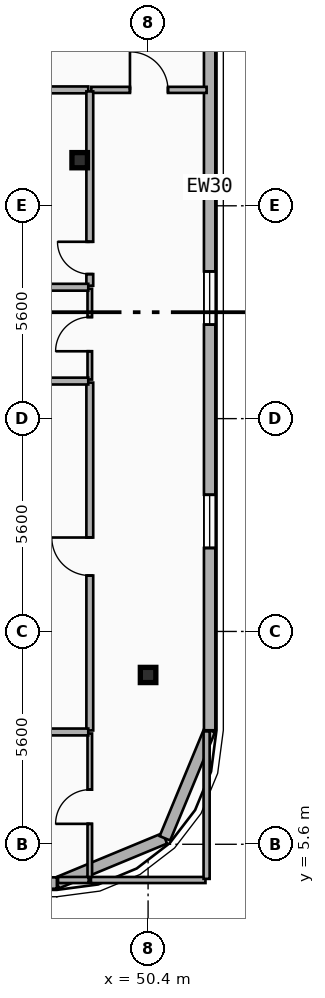
"""IFC4 building model, lengths in metres.
Left out: names, types, materials, properties, quantities, classifications, styles, units other than length and angle.
Written with IfcOpenShell. Run it as: python <this file> out.ifc"""

import sys

from ifc_helpers import new_model, si_unit, direction, frame, frame_2d, origin, origin_2d, place, context, subcontext, project, spatial, rectangle, i_section, extrude, element, fill, save


model = new_model("IFC4")
c1 = context("Model", 3, precision=1e-05, world=origin(), true_north=direction((0.0, 1.0)))
c2 = subcontext(c1, "Body", "Model", "MODEL_VIEW")
j1 = project(units=[si_unit("LENGTHUNIT", "METRE"), si_unit("PLANEANGLEUNIT", "RADIAN")], contexts=[c1])
p1 = place(None, origin())
s1 = spatial("IfcSite", under=j1, at=p1, CompositionType="ELEMENT")
p2 = place(p1, origin())
s2 = spatial("IfcBuilding", under=s1, at=p2, CompositionType="ELEMENT")
p3 = place(p2, frame((0.0, 0.0, 196.8)))
s3 = spatial("IfcBuildingStorey", under=s2, at=p3, CompositionType="ELEMENT", Elevation=196.8)
p4 = place(p3, frame((48.6, 23.6, 0.0), z_axis=(0.0, 0.0, 1.0), x_axis=(1.0, 0.0, 0.0)))
e1 = element("IfcColumn", 1, at=p4, inside=s3, PredefinedType="COLUMN", context=c2, shape_type="SweptSolid", body=[
    extrude(i_section(OverallWidth=0.408, OverallDepth=0.4, WebThickness=0.025, FlangeThickness=0.039, FilletRadius=0.015, at=origin_2d()), origin(), (0.0, 0.0, 1.0), 3.6),
])
p5 = place(p3, frame((50.4, 10.151, 0.0), z_axis=(0.0, -0.079906436036, 0.996802368316), x_axis=(1.0, 0.0, 0.0)))
e2 = element("IfcColumn", 2, at=p5, inside=s3, PredefinedType="COLUMN", context=c2, shape_type="SweptSolid", body=[
    extrude(i_section(OverallWidth=0.408, OverallDepth=0.4, WebThickness=0.025, FlangeThickness=0.039, FilletRadius=0.015, at=origin_2d()), origin(), (0.0, 0.0, 1.0), 3.611),
])
p6 = place(p3, frame((50.843, 5.757, 0.0), z_axis=(0.0, 0.0, 1.0), x_axis=(-0.92389884758, -0.382636798336, 0.0)))
e3 = element("IfcWall", 3, at=p6, inside=s3, PredefinedType="SOLIDWALL", context=c2, shape_type="SweptSolid", body=[
    extrude(rectangle(XDim=3.077, YDim=0.3, at=frame_2d((1.538, 0.0))), origin(), (0.0, 0.0, 1.0), 3.34),
])
p7 = place(p3, frame((52.02, 8.6, 0.0), z_axis=(0.0, 0.0, 1.0), x_axis=(-0.382676475685, -0.923882414032, 0.0)))
e4 = element("IfcWall", 4, at=p7, inside=s3, PredefinedType="SOLIDWALL", context=c2, shape_type="SweptSolid", body=[
    extrude(rectangle(XDim=3.077, YDim=0.3, at=frame_2d((1.539, 0.0))), origin(), (0.0, 0.0, 1.0), 3.34),
])
p8 = place(p3, frame((52.02, 37.2, 0.0), z_axis=(0.0, 0.0, 1.0), x_axis=(0.0, -1.0, 0.0)))
e5 = element("IfcWall", 5, at=p8, inside=s3, PredefinedType="SOLIDWALL", context=c2, shape_type="SweptSolid", body=[
    extrude(rectangle(XDim=28.6, YDim=0.3, at=frame_2d((14.3, 0.0))), origin(), (0.0, 0.0, 1.0), 3.34),
])
p9 = place(p8, frame((2.38, 0.0, 0.34)))
e6 = element("IfcOpeningElement", 6, at=p9, cuts=e5, PredefinedType="OPENING", context=c2, shape_type="SweptSolid", body=[
    extrude(rectangle(XDim=1.4, YDim=2.1, at=frame_2d((0.7, 1.05))), frame((0.0, 0.16, 0.0), z_axis=(0.0, -1.0, 0.0), x_axis=(1.0, 0.0, 0.0)), (0.0, 0.0, 1.0), 0.32),
])
p10 = place(p8, frame((5.84, 0.0, 0.34)))
e7 = element("IfcOpeningElement", 7, at=p10, cuts=e5, PredefinedType="OPENING", context=c2, shape_type="SweptSolid", body=[
    extrude(rectangle(XDim=1.4, YDim=2.1, at=frame_2d((0.7, 1.05))), frame((0.0, 0.16, 0.0), z_axis=(0.0, -1.0, 0.0), x_axis=(1.0, 0.0, 0.0)), (0.0, 0.0, 1.0), 0.32),
])
p11 = place(p8, frame((16.527, 0.0, 0.34)))
e8 = element("IfcOpeningElement", 8, at=p11, cuts=e5, PredefinedType="OPENING", context=c2, shape_type="SweptSolid", body=[
    extrude(rectangle(XDim=1.4, YDim=2.1, at=frame_2d((0.7, 1.05))), frame((0.0, 0.16, 0.0), z_axis=(0.0, -1.0, 0.0), x_axis=(1.0, 0.0, 0.0)), (0.0, 0.0, 1.0), 0.32),
])
p12 = place(p8, frame((22.403, 0.0, 0.34)))
e9 = element("IfcOpeningElement", 9, at=p12, cuts=e5, PredefinedType="OPENING", context=c2, shape_type="SweptSolid", body=[
    extrude(rectangle(XDim=1.4, YDim=2.1, at=frame_2d((0.7, 1.05))), frame((0.0, 0.16, 0.0), z_axis=(0.0, -1.0, 0.0), x_axis=(1.0, 0.0, 0.0)), (0.0, 0.0, 1.0), 0.32),
])
p13 = place(p3, frame((48.0, 4.58, 0.0), z_axis=(0.0, 0.0, 1.0), x_axis=(-1.0, 0.0, 0.0)))
e10 = element("IfcWall", 10, at=p13, inside=s3, PredefinedType="SOLIDWALL", context=c2, shape_type="SweptSolid", body=[
    extrude(rectangle(XDim=38.4, YDim=0.3, at=frame_2d((19.2, 0.0))), origin(), (0.0, 0.0, 1.0), 3.34),
])
p14 = place(p13, frame((36.19, 0.0, 0.8)))
e11 = element("IfcOpeningElement", 11, at=p14, cuts=e10, PredefinedType="OPENING", context=c2, shape_type="SweptSolid", body=[
    extrude(rectangle(XDim=1.8, YDim=1.8, at=frame_2d((0.9, 0.9))), frame((0.0, 0.16, 0.0), z_axis=(0.0, -1.0, 0.0), x_axis=(1.0, 0.0, 0.0)), (0.0, 0.0, 1.0), 0.32),
])
p15 = place(p13, frame((29.712, 0.0, 0.7)))
e12 = element("IfcOpeningElement", 12, at=p15, cuts=e10, PredefinedType="OPENING", context=c2, shape_type="SweptSolid", body=[
    extrude(rectangle(XDim=2.0, YDim=2.2, at=frame_2d((1.0, 1.1))), frame((0.0, 0.16, 0.0), z_axis=(0.0, -1.0, 0.0), x_axis=(1.0, 0.0, 0.0)), (0.0, 0.0, 1.0), 0.32),
])
p16 = place(p13, frame((33.038, 0.0, 0.7)))
e13 = element("IfcOpeningElement", 13, at=p16, cuts=e10, PredefinedType="OPENING", context=c2, shape_type="SweptSolid", body=[
    extrude(rectangle(XDim=2.0, YDim=2.2, at=frame_2d((1.0, 1.1))), frame((0.0, 0.16, 0.0), z_axis=(0.0, -1.0, 0.0), x_axis=(1.0, 0.0, 0.0)), (0.0, 0.0, 1.0), 0.32),
])
p17 = place(p13, frame((20.0, 0.0, 0.7)))
e14 = element("IfcOpeningElement", 14, at=p17, cuts=e10, PredefinedType="OPENING", context=c2, shape_type="SweptSolid", body=[
    extrude(rectangle(XDim=2.0, YDim=2.2, at=frame_2d((1.0, 1.1))), frame((0.0, 0.16, 0.0), z_axis=(0.0, -1.0, 0.0), x_axis=(1.0, 0.0, 0.0)), (0.0, 0.0, 1.0), 0.32),
])
p18 = place(p13, frame((25.2, 0.0, 0.7)))
e15 = element("IfcOpeningElement", 15, at=p18, cuts=e10, PredefinedType="OPENING", context=c2, shape_type="SweptSolid", body=[
    extrude(rectangle(XDim=2.0, YDim=2.2, at=frame_2d((1.0, 1.1))), frame((0.0, 0.16, 0.0), z_axis=(0.0, -1.0, 0.0), x_axis=(1.0, 0.0, 0.0)), (0.0, 0.0, 1.0), 0.32),
])
p19 = place(p13, frame((13.4, 0.0, 0.7)))
e16 = element("IfcOpeningElement", 16, at=p19, cuts=e10, PredefinedType="OPENING", context=c2, shape_type="SweptSolid", body=[
    extrude(rectangle(XDim=2.0, YDim=2.2, at=frame_2d((1.0, 1.1))), frame((0.0, 0.16, 0.0), z_axis=(0.0, -1.0, 0.0), x_axis=(1.0, 0.0, 0.0)), (0.0, 0.0, 1.0), 0.32),
])
p20 = place(p13, frame((6.993, 0.0, 0.7)))
e17 = element("IfcOpeningElement", 17, at=p20, cuts=e10, PredefinedType="OPENING", context=c2, shape_type="SweptSolid", body=[
    extrude(rectangle(XDim=2.0, YDim=2.2, at=frame_2d((1.0, 1.1))), frame((0.0, 0.16, 0.0), z_axis=(0.0, -1.0, 0.0), x_axis=(1.0, 0.0, 0.0)), (0.0, 0.0, 1.0), 0.32),
])
p21 = place(p13, frame((3.469, 0.0, 0.7)))
e18 = element("IfcOpeningElement", 18, at=p21, cuts=e10, PredefinedType="OPENING", context=c2, shape_type="SweptSolid", body=[
    extrude(rectangle(XDim=2.0, YDim=2.2, at=frame_2d((1.0, 1.1))), frame((0.0, 0.16, 0.0), z_axis=(0.0, -1.0, 0.0), x_axis=(1.0, 0.0, 0.0)), (0.0, 0.0, 1.0), 0.32),
])
p22 = place(p13, frame((0.41, 0.0, 0.8)))
e19 = element("IfcOpeningElement", 19, at=p22, cuts=e10, PredefinedType="OPENING", context=c2, shape_type="SweptSolid", body=[
    extrude(rectangle(XDim=1.8, YDim=1.8, at=frame_2d((0.9, 0.9))), frame((0.0, 0.16, 0.0), z_axis=(0.0, -1.0, 0.0), x_axis=(1.0, 0.0, 0.0)), (0.0, 0.0, 1.0), 0.32),
])
p23 = place(p3, frame((48.906, 25.45, 0.0), z_axis=(0.0, 0.0, 1.0), x_axis=(1.0, 0.0, 0.0)))
e20 = element("IfcWall", 20, at=p23, inside=s3, PredefinedType="PARTITIONING", context=c2, shape_type="SweptSolid", body=[
    extrude(rectangle(XDim=3.034, YDim=0.16, at=frame_2d((1.517, 0.0))), origin(), (0.0, 0.0, 1.0), 2.67),
])
p24 = place(p23, frame((1.017, 0.0, 0.0)))
e21 = element("IfcOpeningElement", 21, at=p24, cuts=e20, PredefinedType="OPENING", context=c2, shape_type="SweptSolid", body=[
    extrude(rectangle(XDim=1.0, YDim=2.15, at=frame_2d((0.5, 1.075))), frame((0.0, 0.09, 0.0), z_axis=(0.0, -1.0, 0.0), x_axis=(1.0, 0.0, 0.0)), (0.0, 0.0, 1.0), 0.18),
])
p25 = place(p3, frame((45.44, 25.45, 0.0), z_axis=(0.0, 0.0, 1.0), x_axis=(1.0, 0.0, 0.0)))
e22 = element("IfcWall", 22, at=p25, inside=s3, PredefinedType="PLUMBINGWALL", context=c2, shape_type="SweptSolid", body=[
    extrude(rectangle(XDim=3.386, YDim=0.18, at=frame_2d((1.693, 0.0))), origin(), (0.0, 0.0, 1.0), 2.42),
])
p26 = place(p3, frame((48.866, 4.66, 0.0), z_axis=(0.0, 0.0, 1.0), x_axis=(0.0, 1.0, 0.0)))
e23 = element("IfcWall", 23, at=p26, inside=s3, PredefinedType="PARTITIONING", context=c2, shape_type="SweptSolid", body=[
    extrude(rectangle(XDim=3.855, YDim=0.12, at=frame_2d((1.927, 0.0))), origin(), (0.0, 0.0, 1.0), 3.34),
])
p27 = place(p26, frame((1.478, 0.0, 0.0)))
e24 = element("IfcOpeningElement", 24, at=p27, cuts=e23, PredefinedType="OPENING", context=c2, shape_type="SweptSolid", body=[
    extrude(rectangle(XDim=0.9, YDim=2.1, at=frame_2d((0.45, 1.05))), frame((0.0, 0.07, 0.0), z_axis=(0.0, -1.0, 0.0), x_axis=(1.0, 0.0, 0.0)), (0.0, 0.0, 1.0), 0.14),
])
p28 = place(p3, frame((48.866, 8.595, 0.0), z_axis=(0.0, 0.0, 1.0), x_axis=(0.0, 1.0, 0.0)))
e25 = element("IfcWall", 25, at=p28, inside=s3, PredefinedType="PLUMBINGWALL", context=c2, shape_type="SweptSolid", body=[
    extrude(rectangle(XDim=9.153, YDim=0.18, at=frame_2d((4.577, 0.0))), origin(), (0.0, 0.0, 1.0), 2.82),
])
p29 = place(p28, frame((4.076, 0.0, 0.0)))
e26 = element("IfcOpeningElement", 26, at=p29, cuts=e25, PredefinedType="OPENING", context=c2, shape_type="SweptSolid", body=[
    extrude(rectangle(XDim=1.0, YDim=2.15, at=frame_2d((0.5, 1.075))), frame((0.0, 0.1, 0.0), z_axis=(0.0, -1.0, 0.0), x_axis=(1.0, 0.0, 0.0)), (0.0, 0.0, 1.0), 0.2),
])
p30 = place(p3, frame((48.866, 17.828, 0.0), z_axis=(0.0, 0.0, 1.0), x_axis=(0.0, 1.0, 0.0)))
e27 = element("IfcWall", 27, at=p30, inside=s3, PredefinedType="PARTITIONING", context=c2, shape_type="SweptSolid", body=[
    extrude(rectangle(XDim=2.389, YDim=0.12, at=frame_2d((1.195, 0.0))), origin(), (0.0, 0.0, 1.0), 2.82),
])
p31 = place(p30, frame((0.744, 0.0, 0.0)))
e28 = element("IfcOpeningElement", 28, at=p31, cuts=e27, PredefinedType="OPENING", context=c2, shape_type="SweptSolid", body=[
    extrude(rectangle(XDim=0.9, YDim=2.1, at=frame_2d((0.45, 1.05))), frame((0.0, 0.07, 0.0), z_axis=(0.0, -1.0, 0.0), x_axis=(1.0, 0.0, 0.0)), (0.0, 0.0, 1.0), 0.14),
])
p32 = place(p3, frame((48.866, 20.297, 0.0), z_axis=(0.0, 0.0, 1.0), x_axis=(0.0, 1.0, 0.0)))
e29 = element("IfcWall", 29, at=p32, inside=s3, PredefinedType="PLUMBINGWALL", context=c2, shape_type="SweptSolid", body=[
    extrude(rectangle(XDim=5.113, YDim=0.18, at=frame_2d((2.556, 0.0))), origin(), (0.0, 0.0, 1.0), 2.82),
])
p33 = place(p32, frame((0.306, 0.0, 0.0)))
e30 = element("IfcOpeningElement", 30, at=p33, cuts=e29, PredefinedType="OPENING", context=c2, shape_type="SweptSolid", body=[
    extrude(rectangle(XDim=0.85, YDim=2.1, at=frame_2d((0.425, 1.05))), frame((0.0, 0.1, 0.0), z_axis=(0.0, -1.0, 0.0), x_axis=(1.0, 0.0, 0.0)), (0.0, 0.0, 1.0), 0.2),
])
for number, where, z_axis, x_axis in (
    (31, (45.44, 8.555, 0.0), (0.0, 0.0, 1.0), (1.0, 0.0, 0.0)),
    (32, (45.44, 17.788, 0.0), (0.0, 0.0, 1.0), (1.0, 0.0, 0.0)),
    (33, (45.44, 20.257, 0.0), (0.0, 0.0, 1.0), (1.0, 0.0, 0.0)),
):
    element("IfcWall", number, at=place(p3, frame(where, z_axis=z_axis, x_axis=x_axis)), inside=s3, PredefinedType="PLUMBINGWALL", context=c2, shape_type="SweptSolid", body=[
        extrude(rectangle(XDim=3.386, YDim=0.18, at=frame_2d((1.693, 0.0))), origin(), (0.0, 0.0, 1.0), 2.42),
    ])
p34 = place(p3, frame((48.896, 4.66, 0.0), z_axis=(0.0, 0.0, 1.0), x_axis=(1.0, 0.0, 0.0)))
e34 = element("IfcWall", 34, at=p34, inside=s3, PredefinedType="PARTITIONING", context=c2, shape_type="SweptSolid", body=[
    extrude(rectangle(XDim=3.014, YDim=0.16, at=frame_2d((1.507, 0.0))), origin(), (0.0, 0.0, 1.0), 3.34),
])
p35 = place(p3, frame((51.94, 4.69, 0.0), z_axis=(0.0, 0.0, 1.0), x_axis=(0.0, 1.0, 0.0)))
e35 = element("IfcWall", 35, at=p35, inside=s3, PredefinedType="PARTITIONING", context=c2, shape_type="SweptSolid", body=[
    extrude(rectangle(XDim=3.88, YDim=0.16, at=frame_2d((1.94, 0.0))), origin(), (0.0, 0.0, 1.0), 3.34),
])
p36 = place(p3, frame((48.03, 4.66, 0.0), z_axis=(0.0, 0.0, 1.0), x_axis=(1.0, 0.0, 0.0)))
e36 = element("IfcWall", 36, at=p36, inside=s3, PredefinedType="PARTITIONING", context=c2, shape_type="SweptSolid", body=[
    extrude(rectangle(XDim=0.806, YDim=0.16, at=frame_2d((0.403, 0.0))), origin(), (0.0, 0.0, 1.0), 3.34),
])
p37 = place(p11, origin())
e37 = element("IfcWindow", 37, at=p37, inside=s3, PartitioningType="SINGLE_PANEL", PredefinedType="WINDOW", context=c2, shape_type="SweptSolid", body=[
    extrude(rectangle(XDim=1.4, YDim=2.1, at=frame_2d((0.7, 1.05))), frame((0.0, 0.03, 0.0), z_axis=(0.0, -1.0, 0.0), x_axis=(1.0, 0.0, 0.0)), (0.0, 0.0, 1.0), 0.06),
])
fill(e8, e37)
p38 = place(p12, origin())
e38 = element("IfcWindow", 38, at=p38, inside=s3, PartitioningType="SINGLE_PANEL", PredefinedType="WINDOW", context=c2, shape_type="SweptSolid", body=[
    extrude(rectangle(XDim=1.4, YDim=2.1, at=frame_2d((0.7, 1.05))), frame((0.0, 0.03, 0.0), z_axis=(0.0, -1.0, 0.0), x_axis=(1.0, 0.0, 0.0)), (0.0, 0.0, 1.0), 0.06),
])
fill(e9, e38)
p39 = place(p24, origin())
e39 = element("IfcDoor", 39, at=p39, inside=s3, OperationType="SINGLE_SWING_LEFT", PredefinedType="DOOR", context=c2, shape_type="SweptSolid", body=[
    extrude(rectangle(XDim=1.0, YDim=2.15, at=frame_2d((0.5, 1.075))), frame((0.0, 0.025, 0.0), z_axis=(0.0, -1.0, 0.0), x_axis=(1.0, 0.0, 0.0)), (0.0, 0.0, 1.0), 0.05),
])
fill(e21, e39)
p40 = place(p27, origin())
e40 = element("IfcDoor", 40, at=p40, inside=s3, OperationType="SINGLE_SWING_LEFT", PredefinedType="DOOR", context=c2, shape_type="SweptSolid", body=[
    extrude(rectangle(XDim=0.9, YDim=2.1, at=frame_2d((0.45, 1.05))), frame((0.0, 0.025, 0.0), z_axis=(0.0, -1.0, 0.0), x_axis=(1.0, 0.0, 0.0)), (0.0, 0.0, 1.0), 0.05),
])
fill(e24, e40)
p41 = place(p29, origin())
e41 = element("IfcDoor", 41, at=p41, inside=s3, OperationType="SINGLE_SWING_RIGHT", PredefinedType="DOOR", context=c2, shape_type="SweptSolid", body=[
    extrude(rectangle(XDim=1.0, YDim=2.15, at=frame_2d((0.5, 1.075))), frame((0.0, 0.025, 0.0), z_axis=(0.0, -1.0, 0.0), x_axis=(1.0, 0.0, 0.0)), (0.0, 0.0, 1.0), 0.05),
])
fill(e26, e41)
p42 = place(p31, origin())
e42 = element("IfcDoor", 42, at=p42, inside=s3, OperationType="SINGLE_SWING_LEFT", PredefinedType="DOOR", context=c2, shape_type="SweptSolid", body=[
    extrude(rectangle(XDim=0.9, YDim=2.1, at=frame_2d((0.45, 1.05))), frame((0.0, 0.025, 0.0), z_axis=(0.0, -1.0, 0.0), x_axis=(1.0, 0.0, 0.0)), (0.0, 0.0, 1.0), 0.05),
])
fill(e28, e42)
p43 = place(p33, origin())
e43 = element("IfcDoor", 43, at=p43, inside=s3, OperationType="SINGLE_SWING_RIGHT", PredefinedType="DOOR", context=c2, shape_type="SweptSolid", body=[
    extrude(rectangle(XDim=0.85, YDim=2.1, at=frame_2d((0.425, 1.05))), frame((0.0, 0.025, 0.0), z_axis=(0.0, -1.0, 0.0), x_axis=(1.0, 0.0, 0.0)), (0.0, 0.0, 1.0), 0.05),
])
fill(e30, e43)
save(model, sys.argv[1])
